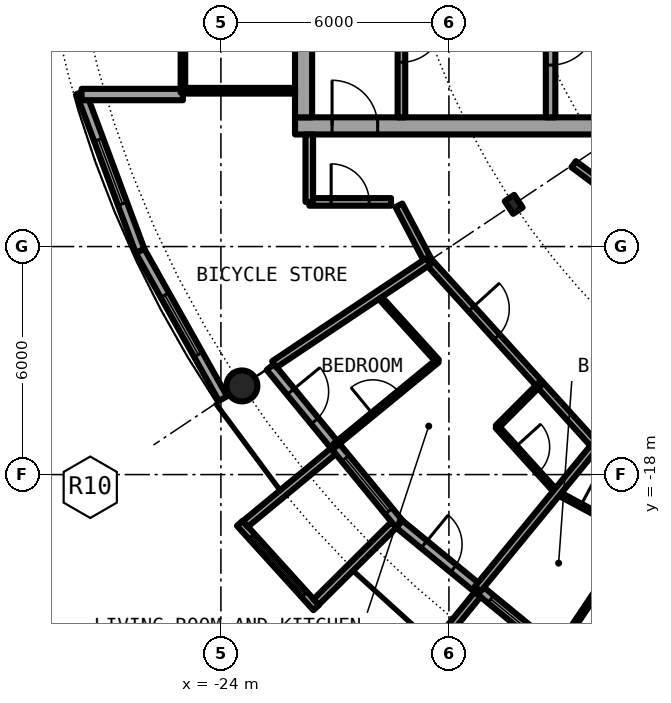
"""IFC4 building model, lengths in metres.
Left out: names, types, materials, properties, quantities, classifications, styles, units other than length and angle.
Written with IfcOpenShell. Run it as: python <this file> out.ifc"""

import sys

from ifc_helpers import new_model, si_unit, direction, frame, frame_2d, origin, origin_2d, place, context, subcontext, project, spatial, rectangle, circle, hollow_circle, i_section, extrude, element, fill, save


model = new_model("IFC4")
c1 = context("Model", 3, precision=1e-05, world=origin(), true_north=direction((0.0, 1.0)))
c2 = subcontext(c1, "Body", "Model", "MODEL_VIEW")
j1 = project(units=[si_unit("LENGTHUNIT", "METRE"), si_unit("PLANEANGLEUNIT", "RADIAN")], contexts=[c1])
p1 = place(None, origin())
s1 = spatial("IfcSite", under=j1, at=p1, CompositionType="ELEMENT")
p2 = place(p1, origin())
s2 = spatial("IfcBuilding", under=s1, at=p2, CompositionType="ELEMENT")
p3 = place(p2, frame((0.0, 0.0, 218.8)))
s3 = spatial("IfcBuildingStorey", under=s2, at=p3, CompositionType="ELEMENT", Elevation=218.8)
p4 = place(p3, frame((-23.448, -15.667, 0.0), z_axis=(0.0, 0.0, 1.0), x_axis=(1.0, 0.0, 0.0)))
e1 = element("IfcColumn", 1, at=p4, inside=s3, PredefinedType="COLUMN", context=c2, shape_type="SweptSolid", body=[
    extrude(hollow_circle(Radius=0.406, WallThickness=0.03, at=origin_2d()), origin(), (0.0, 0.0, 1.0), 3.05),
])
p5 = place(p3, frame((-16.297, -10.889, 0.0), z_axis=(0.0, 0.0, 1.0), x_axis=(-0.831469612303, -0.55557023302, 0.0)))
e2 = element("IfcColumn", 2, at=p5, inside=s3, PredefinedType="COLUMN", context=c2, shape_type="SweptSolid", body=[
    extrude(i_section(OverallWidth=0.3, OverallDepth=0.4, WebThickness=0.013, FlangeThickness=0.024, FilletRadius=0.027, at=origin_2d()), origin(), (0.0, 0.0, 1.0), 3.05),
])
p6 = place(p3, frame((-22.699, -15.167, 0.0), z_axis=(0.0, 0.0, 1.0), x_axis=(0.634382322723, -0.773019449054, 0.0)))
e3 = element("IfcWall", 3, at=p6, inside=s3, PredefinedType="SOLIDWALL", context=c2, shape_type="SweptSolid", body=[
    extrude(rectangle(XDim=5.352, YDim=0.25, at=frame_2d((2.676, 0.0))), origin(), (0.0, 0.0, 1.0), 2.65),
])
p7 = place(p6, frame((0.841, 0.0, 0.0)))
e4 = element("IfcOpeningElement", 4, at=p7, cuts=e3, PredefinedType="OPENING", context=c2, shape_type="SweptSolid", body=[
    extrude(rectangle(XDim=1.0, YDim=2.2, at=frame_2d((0.5, 1.1))), frame((0.0, 0.135, 0.0), z_axis=(0.0, -1.0, 0.0), x_axis=(1.0, 0.0, 0.0)), (0.0, 0.0, 1.0), 0.27),
])
p8 = place(p6, frame((3.111, 0.0, 0.3)))
e5 = element("IfcOpeningElement", 5, at=p8, cuts=e3, PredefinedType="OPENING", context=c2, shape_type="SweptSolid", body=[
    extrude(rectangle(XDim=1.8, YDim=2.1, at=frame_2d((0.9, 1.05))), frame((0.0, 0.135, 0.0), z_axis=(0.0, -1.0, 0.0), x_axis=(1.0, 0.0, 0.0)), (0.0, 0.0, 1.0), 0.27),
])
p9 = place(p3, frame((-23.503, -19.282, -0.03), z_axis=(0.0, 0.0, 1.0), x_axis=(0.671506829416, -0.740998365753, 0.0)))
e6 = element("IfcWall", 6, at=p9, inside=s3, PredefinedType="SOLIDWALL", context=c2, shape_type="SweptSolid", body=[
    extrude(rectangle(XDim=2.993, YDim=0.2, at=frame_2d((1.497, 0.0))), origin(), (0.0, 0.0, 1.0), 2.68),
])
p10 = place(p9, frame((0.457, 0.0, 0.33)))
e7 = element("IfcOpeningElement", 7, at=p10, cuts=e6, PredefinedType="OPENING", context=c2, shape_type="SweptSolid", body=[
    extrude(circle(Radius=1.04, at=frame_2d((1.04, 1.04))), frame((0.0, 0.11, 0.0), z_axis=(0.0, -1.0, 0.0), x_axis=(1.0, 0.0, 0.0)), (0.0, 0.0, 1.0), 0.22),
])
p11 = place(p3, frame((-21.041, -17.384, -0.03), z_axis=(0.0, 0.0, 1.0), x_axis=(-0.770784861449, -0.63709551667, 0.0)))
e8 = element("IfcWall", 8, at=p11, inside=s3, PredefinedType="SOLIDWALL", context=c2, shape_type="SweptSolid", body=[
    extrude(rectangle(XDim=3.006, YDim=0.2, at=frame_2d((1.503, 0.0))), origin(), (0.0, 0.0, 1.0), 2.68),
])
p12 = place(p3, frame((-19.45, -19.323, -0.03), z_axis=(0.0, 0.0, 1.0), x_axis=(-0.709727076896, -0.704476739375, 0.0)))
e9 = element("IfcWall", 9, at=p12, inside=s3, PredefinedType="SOLIDWALL", context=c2, shape_type="SweptSolid", body=[
    extrude(rectangle(XDim=2.883, YDim=0.2, at=frame_2d((1.441, 0.0))), origin(), (0.0, 0.0, 1.0), 2.68),
])
p13 = place(p3, frame((-19.304, -19.304, 0.0), z_axis=(0.0, 0.0, 1.0), x_axis=(0.773019449054, -0.634382322723, 0.0)))
e10 = element("IfcWall", 10, at=p13, inside=s3, PredefinedType="SOLIDWALL", context=c2, shape_type="SweptSolid", body=[
    extrude(rectangle(XDim=5.352, YDim=0.25, at=frame_2d((2.676, 0.0))), origin(), (0.0, 0.0, 1.0), 2.65),
])
p14 = place(p13, frame((0.841, 0.0, 0.0)))
e11 = element("IfcOpeningElement", 11, at=p14, cuts=e10, PredefinedType="OPENING", context=c2, shape_type="SweptSolid", body=[
    extrude(rectangle(XDim=1.0, YDim=2.2, at=frame_2d((0.5, 1.1))), frame((0.0, 0.135, 0.0), z_axis=(0.0, -1.0, 0.0), x_axis=(1.0, 0.0, 0.0)), (0.0, 0.0, 1.0), 0.27),
])
p15 = place(p13, frame((3.111, 0.0, 0.3)))
e12 = element("IfcOpeningElement", 12, at=p15, cuts=e10, PredefinedType="OPENING", context=c2, shape_type="SweptSolid", body=[
    extrude(rectangle(XDim=1.8, YDim=2.1, at=frame_2d((0.9, 1.05))), frame((0.0, 0.135, 0.0), z_axis=(0.0, -1.0, 0.0), x_axis=(1.0, 0.0, 0.0)), (0.0, 0.0, 1.0), 0.27),
])
p16 = place(p3, frame((-17.246, -21.155, -0.03), z_axis=(0.0, 0.0, 1.0), x_axis=(-0.631741648902, -0.775179004516, 0.0)))
e13 = element("IfcWall", 13, at=p16, inside=s3, PredefinedType="SOLIDWALL", context=c2, shape_type="SweptSolid", body=[
    extrude(rectangle(XDim=3.006, YDim=0.2, at=frame_2d((1.503, 0.0))), origin(), (0.0, 0.0, 1.0), 2.68),
])
p17 = place(p3, frame((-27.682, -7.945, 0.0), z_axis=(0.0, 0.0, 1.0), x_axis=(0.349247811493, -0.937030397675, 0.0)))
e14 = element("IfcWall", 14, at=p17, inside=s3, PredefinedType="SOLIDWALL", context=c2, shape_type="SweptSolid", body=[
    extrude(rectangle(XDim=4.452, YDim=0.25, at=frame_2d((2.226, 0.0))), origin(), (0.0, 0.0, 1.0), 2.65),
])
p18 = place(p17, frame((1.327, 0.0, 0.3)))
e15 = element("IfcOpeningElement", 15, at=p18, cuts=e14, PredefinedType="OPENING", context=c2, shape_type="SweptSolid", body=[
    extrude(rectangle(XDim=1.8, YDim=2.1, at=frame_2d((0.9, 1.05))), frame((0.0, 0.135, 0.0), z_axis=(0.0, -1.0, 0.0), x_axis=(1.0, 0.0, 0.0)), (0.0, 0.0, 1.0), 0.27),
])
p19 = place(p3, frame((-26.127, -12.117, 0.0), z_axis=(0.0, 0.0, 1.0), x_axis=(0.489696356642, -0.871893042919, 0.0)))
e16 = element("IfcWall", 16, at=p19, inside=s3, PredefinedType="SOLIDWALL", context=c2, shape_type="SweptSolid", body=[
    extrude(rectangle(XDim=4.454, YDim=0.25, at=frame_2d((2.227, 0.0))), origin(), (0.0, 0.0, 1.0), 2.65),
])
p20 = place(p19, frame((1.327, 0.0, 0.3)))
e17 = element("IfcOpeningElement", 17, at=p20, cuts=e16, PredefinedType="OPENING", context=c2, shape_type="SweptSolid", body=[
    extrude(rectangle(XDim=1.8, YDim=2.1, at=frame_2d((0.9, 1.05))), frame((0.0, 0.135, 0.0), z_axis=(0.0, -1.0, 0.0), x_axis=(1.0, 0.0, 0.0)), (0.0, 0.0, 1.0), 0.27),
])
p21 = place(p3, frame((-25.0, -8.0, 0.0), z_axis=(0.0, 0.0, 1.0), x_axis=(-1.0, 0.0, 0.0)))
e18 = element("IfcWall", 18, at=p21, inside=s3, PredefinedType="SOLIDWALL", context=c2, shape_type="SweptSolid", body=[
    extrude(rectangle(XDim=2.667, YDim=0.3, at=frame_2d((1.333, 0.0))), origin(), (0.0, 0.0, 1.0), 2.65),
])
p22 = place(p3, frame((-22.05, -8.825, 0.0), z_axis=(0.0, 0.0, 1.0), x_axis=(1.0, 0.0, 0.0)))
e19 = element("IfcWall", 19, at=p22, inside=s3, PredefinedType="SHEAR", context=c2, shape_type="SweptSolid", body=[
    extrude(rectangle(XDim=13.5, YDim=0.45, at=frame_2d((6.75, 0.0))), origin(), (0.0, 0.0, 1.0), 3.05),
])
p23 = place(p22, frame((0.975, 0.0, 0.0)))
e20 = element("IfcOpeningElement", 20, at=p23, cuts=e19, PredefinedType="OPENING", context=c2, shape_type="SweptSolid", body=[
    extrude(rectangle(XDim=1.2, YDim=2.3, at=frame_2d((0.6, 1.15))), frame((0.0, 0.235, 0.0), z_axis=(0.0, -1.0, 0.0), x_axis=(1.0, 0.0, 0.0)), (0.0, 0.0, 1.0), 0.47),
])
p24 = place(p3, frame((-21.825, -8.6, 0.0), z_axis=(0.0, 0.0, 1.0), x_axis=(0.0, 1.0, 0.0)))
e21 = element("IfcWall", 21, at=p24, inside=s3, PredefinedType="SHEAR", context=c2, shape_type="SweptSolid", body=[
    extrude(rectangle(XDim=17.2, YDim=0.45, at=frame_2d((8.6, 0.0))), origin(), (0.0, 0.0, 1.0), 3.05),
])
p25 = place(p24, frame((7.7, 0.0, 0.0)))
e22 = element("IfcOpeningElement", 22, at=p25, cuts=e21, PredefinedType="OPENING", context=c2, shape_type="SweptSolid", body=[
    extrude(rectangle(XDim=1.8, YDim=2.3, at=frame_2d((0.9, 1.15))), frame((0.0, 0.235, 0.0), z_axis=(0.0, -1.0, 0.0), x_axis=(1.0, 0.0, 0.0)), (0.0, 0.0, 1.0), 0.47),
])
p26 = place(p3, frame((-15.325, -4.65, 0.0), z_axis=(0.0, 0.0, 1.0), x_axis=(0.0, -1.0, 0.0)))
e23 = element("IfcWall", 23, at=p26, inside=s3, PredefinedType="SHEAR", context=c2, shape_type="SweptSolid", body=[
    extrude(rectangle(XDim=3.95, YDim=0.25, at=frame_2d((1.975, 0.0))), origin(), (0.0, 0.0, 1.0), 3.05),
])
p27 = place(p26, frame((1.375, 0.0, 0.0)))
e24 = element("IfcOpeningElement", 24, at=p27, cuts=e23, PredefinedType="OPENING", context=c2, shape_type="SweptSolid", body=[
    extrude(rectangle(XDim=1.2, YDim=2.3, at=frame_2d((0.6, 1.15))), frame((0.0, 0.135, 0.0), z_axis=(0.0, -1.0, 0.0), x_axis=(1.0, 0.0, 0.0)), (0.0, 0.0, 1.0), 0.27),
])
p28 = place(p3, frame((-19.25, -1.575, 0.0), z_axis=(0.0, 0.0, 1.0), x_axis=(0.0, -1.0, 0.0)))
e25 = element("IfcWall", 25, at=p28, inside=s3, PredefinedType="SOLIDWALL", context=c2, shape_type="SweptSolid", body=[
    extrude(rectangle(XDim=7.025, YDim=0.2, at=frame_2d((3.513, 0.0))), origin(), (0.0, 0.0, 1.0), 2.65),
])
p29 = place(p28, frame((4.475, 0.0, 0.0)))
e26 = element("IfcOpeningElement", 26, at=p29, cuts=e25, PredefinedType="OPENING", context=c2, shape_type="SweptSolid", body=[
    extrude(rectangle(XDim=1.1, YDim=2.3, at=frame_2d((0.55, 1.15))), frame((0.0, 0.11, 0.0), z_axis=(0.0, -1.0, 0.0), x_axis=(1.0, 0.0, 0.0)), (0.0, 0.0, 1.0), 0.22),
])
p30 = place(p3, frame((-22.05, -7.9, 0.0), z_axis=(0.0, 0.0, 1.0), x_axis=(-1.0, 0.0, 0.0)))
e27 = element("IfcWall", 27, at=p30, inside=s3, PredefinedType="PARTITIONING", context=c2, shape_type="SweptSolid", body=[
    extrude(rectangle(XDim=2.89, YDim=0.15, at=frame_2d((1.445, 0.0))), origin(), (0.0, 0.0, 1.0), 2.65),
])
p31 = place(p3, frame((-25.0, 7.95, 0.0), z_axis=(0.0, 0.0, 1.0), x_axis=(0.0, -1.0, 0.0)))
e28 = element("IfcWall", 28, at=p31, inside=s3, PredefinedType="PARTITIONING", context=c2, shape_type="SweptSolid", body=[
    extrude(rectangle(XDim=15.9, YDim=0.12, at=frame_2d((7.95, 0.0))), origin(), (0.0, 0.0, 1.0), 2.65),
])
p32 = place(p31, frame((0.95, 0.0, 0.1)))
e29 = element("IfcOpeningElement", 29, at=p32, cuts=e28, PredefinedType="OPENING", context=c2, shape_type="SweptSolid", body=[
    extrude(rectangle(XDim=14.0, YDim=1.85, at=frame_2d((7.0, 0.925))), frame((0.0, 0.07, 0.0), z_axis=(0.0, -1.0, 0.0), x_axis=(1.0, 0.0, 0.0)), (0.0, 0.0, 1.0), 0.14),
])
p33 = place(p3, frame((-19.872, -13.278, 0.0), z_axis=(0.0, 0.0, 1.0), x_axis=(0.671637685376, -0.740879760544, 0.0)))
e30 = element("IfcWall", 30, at=p33, inside=s3, PredefinedType="PARTITIONING", context=c2, shape_type="SweptSolid", body=[
    extrude(rectangle(XDim=2.338, YDim=0.1, at=frame_2d((1.169, 0.0))), origin(), (0.0, 0.0, 1.0), 2.65),
])
p34 = place(p3, frame((-16.732, -16.743, 0.0), z_axis=(0.0, 0.0, 1.0), x_axis=(0.671528384412, -0.740978831634, 0.0)))
e31 = element("IfcWall", 31, at=p34, inside=s3, PredefinedType="PARTITIONING", context=c2, shape_type="SweptSolid", body=[
    extrude(rectangle(XDim=2.338, YDim=0.1, at=frame_2d((1.169, 0.0))), origin(), (0.0, 0.0, 1.0), 2.65),
])
p35 = place(p34, frame((0.719, 0.0, 0.0)))
e32 = element("IfcOpeningElement", 32, at=p35, cuts=e31, PredefinedType="OPENING", context=c2, shape_type="SweptSolid", body=[
    extrude(rectangle(XDim=0.9, YDim=2.3, at=frame_2d((0.45, 1.15))), frame((0.0, 0.06, 0.0), z_axis=(0.0, -1.0, 0.0), x_axis=(1.0, 0.0, 0.0)), (0.0, 0.0, 1.0), 0.12),
])
p36 = place(p3, frame((-15.162, -18.475, 0.0), z_axis=(0.0, 0.0, 1.0), x_axis=(0.881916280728, -0.471406060405, 0.0)))
e33 = element("IfcWall", 33, at=p36, inside=s3, PredefinedType="PARTITIONING", context=c2, shape_type="SweptSolid", body=[
    extrude(rectangle(XDim=4.663, YDim=0.1, at=frame_2d((2.331, 0.0))), origin(), (0.0, 0.0, 1.0), 2.65),
])
p37 = place(p36, frame((0.716, 0.0, 0.0)))
e34 = element("IfcOpeningElement", 34, at=p37, cuts=e33, PredefinedType="OPENING", context=c2, shape_type="SweptSolid", body=[
    extrude(rectangle(XDim=0.9, YDim=2.3, at=frame_2d((0.45, 1.15))), frame((0.0, 0.06, 0.0), z_axis=(0.0, -1.0, 0.0), x_axis=(1.0, 0.0, 0.0)), (0.0, 0.0, 1.0), 0.12),
])
p38 = place(p3, frame((-19.317, -10.915, 0.0), z_axis=(0.0, 0.0, 1.0), x_axis=(0.465359652486, -0.885121683068, 0.0)))
e35 = element("IfcWall", 35, at=p38, inside=s3, PredefinedType="PARTITIONING", context=c2, shape_type="SweptSolid", body=[
    extrude(rectangle(XDim=1.665, YDim=0.2, at=frame_2d((0.833, 0.0))), origin(), (0.0, 0.0, 1.0), 2.65),
])
p39 = place(p3, frame((-18.542, -12.389, 0.0), z_axis=(0.0, 0.0, 1.0), x_axis=(0.671561669125, -0.740948665268, 0.0)))
e36 = element("IfcWall", 36, at=p39, inside=s3, PredefinedType="PARTITIONING", context=c2, shape_type="SweptSolid", body=[
    extrude(rectangle(XDim=6.544, YDim=0.2, at=frame_2d((3.272, 0.0))), origin(), (0.0, 0.0, 1.0), 2.65),
])
p40 = place(p39, frame((1.682, 0.0, 0.0)))
e37 = element("IfcOpeningElement", 37, at=p40, cuts=e36, PredefinedType="OPENING", context=c2, shape_type="SweptSolid", body=[
    extrude(rectangle(XDim=1.0, YDim=2.3, at=frame_2d((0.5, 1.15))), frame((0.0, 0.11, 0.0), z_axis=(0.0, -1.0, 0.0), x_axis=(1.0, 0.0, 0.0)), (0.0, 0.0, 1.0), 0.22),
])
p41 = place(p3, frame((-14.718, -9.833, 0.0), z_axis=(0.0, 0.0, 1.0), x_axis=(0.803240181354, -0.595655278712, 0.0)))
e38 = element("IfcWall", 38, at=p41, inside=s3, PredefinedType="PARTITIONING", context=c2, shape_type="SweptSolid", body=[
    extrude(rectangle(XDim=11.928, YDim=0.2, at=frame_2d((5.964, 0.0))), origin(), (0.0, 0.0, 1.0), 2.65),
])
p42 = place(p41, frame((6.316, 0.0, 0.0)))
e39 = element("IfcOpeningElement", 39, at=p42, cuts=e38, PredefinedType="OPENING", context=c2, shape_type="SweptSolid", body=[
    extrude(rectangle(XDim=1.0, YDim=2.3, at=frame_2d((0.5, 1.15))), frame((0.0, 0.11, 0.0), z_axis=(0.0, -1.0, 0.0), x_axis=(1.0, 0.0, 0.0)), (0.0, 0.0, 1.0), 0.22),
])
p43 = place(p3, frame((-21.675, -10.825, 0.0), z_axis=(0.0, 0.0, 1.0), x_axis=(1.0, 0.0, 0.0)))
e40 = element("IfcWall", 40, at=p43, inside=s3, PredefinedType="PARTITIONING", context=c2, shape_type="SweptSolid", body=[
    extrude(rectangle(XDim=2.152, YDim=0.2, at=frame_2d((1.076, 0.0))), origin(), (0.0, 0.0, 1.0), 2.65),
])
p44 = place(p43, frame((0.576, 0.0, 0.0)))
e41 = element("IfcOpeningElement", 41, at=p44, cuts=e40, PredefinedType="OPENING", context=c2, shape_type="SweptSolid", body=[
    extrude(rectangle(XDim=1.0, YDim=2.3, at=frame_2d((0.5, 1.15))), frame((0.0, 0.11, 0.0), z_axis=(0.0, -1.0, 0.0), x_axis=(1.0, 0.0, 0.0)), (0.0, 0.0, 1.0), 0.22),
])
p45 = place(p3, frame((-22.595, -15.098, 0.0), z_axis=(0.0, 0.0, 1.0), x_axis=(0.831387096605, 0.55569370664, 0.0)))
e42 = element("IfcWall", 42, at=p45, inside=s3, PredefinedType="PARTITIONING", context=c2, shape_type="SweptSolid", body=[
    extrude(rectangle(XDim=4.875, YDim=0.2, at=frame_2d((2.438, 0.0))), origin(), (0.0, 0.0, 1.0), 2.65),
])
p46 = place(p3, frame((-21.012, -17.233, 0.0), z_axis=(0.0, 0.0, 1.0), x_axis=(0.773165322764, 0.634204528267, 0.0)))
e43 = element("IfcWall", 43, at=p46, inside=s3, PredefinedType="PARTITIONING", context=c2, shape_type="SweptSolid", body=[
    extrude(rectangle(XDim=3.505, YDim=0.1, at=frame_2d((1.752, 0.0))), origin(), (0.0, 0.0, 1.0), 2.65),
])
p47 = place(p46, frame((1.303, 0.0, 0.0)))
e44 = element("IfcOpeningElement", 44, at=p47, cuts=e43, PredefinedType="OPENING", context=c2, shape_type="SweptSolid", body=[
    extrude(rectangle(XDim=0.9, YDim=2.3, at=frame_2d((0.45, 1.15))), frame((0.0, 0.06, 0.0), z_axis=(0.0, -1.0, 0.0), x_axis=(1.0, 0.0, 0.0)), (0.0, 0.0, 1.0), 0.12),
])
p48 = place(p3, frame((-17.24, -21.007, 0.0), z_axis=(0.0, 0.0, 1.0), x_axis=(0.634374159378, 0.773026148273, 0.0)))
e45 = element("IfcWall", 45, at=p48, inside=s3, PredefinedType="PARTITIONING", context=c2, shape_type="SweptSolid", body=[
    extrude(rectangle(XDim=4.876, YDim=0.2, at=frame_2d((2.438, 0.0))), origin(), (0.0, 0.0, 1.0), 2.65),
])
p49 = place(p3, frame((-16.732, -16.743, 0.0), z_axis=(0.0, 0.0, 1.0), x_axis=(0.70679853939, 0.707414888673, 0.0)))
e46 = element("IfcWall", 46, at=p49, inside=s3, PredefinedType="PARTITIONING", context=c2, shape_type="SweptSolid", body=[
    extrude(rectangle(XDim=1.584, YDim=0.1, at=frame_2d((0.792, 0.0))), origin(), (0.0, 0.0, 1.0), 2.65),
])
p50 = place(p3, frame((-15.119, -22.581, 0.0), z_axis=(0.0, 0.0, 1.0), x_axis=(0.556271723484, 0.831000463088, 0.0)))
e47 = element("IfcWall", 47, at=p50, inside=s3, PredefinedType="PARTITIONING", context=c2, shape_type="SweptSolid", body=[
    extrude(rectangle(XDim=3.619, YDim=0.1, at=frame_2d((1.809, 0.0))), origin(), (0.0, 0.0, 1.0), 2.65),
])
p51 = place(p3, frame((-21.675, -10.825, 0.0), z_axis=(0.0, 0.0, 1.0), x_axis=(0.0, 1.0, 0.0)))
e48 = element("IfcWall", 48, at=p51, inside=s3, PredefinedType="PARTITIONING", context=c2, shape_type="SweptSolid", body=[
    extrude(rectangle(XDim=1.775, YDim=0.2, at=frame_2d((0.887, 0.0))), origin(), (0.0, 0.0, 1.0), 2.65),
])
p52 = place(p7, origin())
e49 = element("IfcDoor", 49, at=p52, inside=s3, OperationType="SINGLE_SWING_LEFT", PredefinedType="DOOR", context=c2, shape_type="SweptSolid", body=[
    extrude(rectangle(XDim=1.0, YDim=2.2, at=frame_2d((0.5, 1.1))), frame((0.0, 0.025, 0.0), z_axis=(0.0, -1.0, 0.0), x_axis=(1.0, 0.0, 0.0)), (0.0, 0.0, 1.0), 0.05),
])
fill(e4, e49)
p53 = place(p8, origin())
e50 = element("IfcWindow", 50, at=p53, inside=s3, PartitioningType="SINGLE_PANEL", PredefinedType="WINDOW", context=c2, shape_type="SweptSolid", body=[
    extrude(rectangle(XDim=1.8, YDim=2.1, at=frame_2d((0.9, 1.05))), frame((0.0, 0.03, 0.0), z_axis=(0.0, -1.0, 0.0), x_axis=(1.0, 0.0, 0.0)), (0.0, 0.0, 1.0), 0.06),
])
fill(e5, e50)
p54 = place(p10, origin())
e51 = element("IfcWindow", 51, at=p54, inside=s3, PartitioningType="SINGLE_PANEL", PredefinedType="WINDOW", context=c2, shape_type="SweptSolid", body=[
    extrude(circle(Radius=1.04, at=frame_2d((1.04, 1.04))), frame((0.0, 0.03, 0.0), z_axis=(0.0, -1.0, 0.0), x_axis=(1.0, 0.0, 0.0)), (0.0, 0.0, 1.0), 0.06),
])
fill(e7, e51)
p55 = place(p14, origin())
e52 = element("IfcDoor", 52, at=p55, inside=s3, OperationType="SINGLE_SWING_LEFT", PredefinedType="DOOR", context=c2, shape_type="SweptSolid", body=[
    extrude(rectangle(XDim=1.0, YDim=2.2, at=frame_2d((0.5, 1.1))), frame((0.0, 0.025, 0.0), z_axis=(0.0, -1.0, 0.0), x_axis=(1.0, 0.0, 0.0)), (0.0, 0.0, 1.0), 0.05),
])
fill(e11, e52)
p56 = place(p15, origin())
e53 = element("IfcWindow", 53, at=p56, inside=s3, PartitioningType="SINGLE_PANEL", PredefinedType="WINDOW", context=c2, shape_type="SweptSolid", body=[
    extrude(rectangle(XDim=1.8, YDim=2.1, at=frame_2d((0.9, 1.05))), frame((0.0, 0.03, 0.0), z_axis=(0.0, -1.0, 0.0), x_axis=(1.0, 0.0, 0.0)), (0.0, 0.0, 1.0), 0.06),
])
fill(e12, e53)
p57 = place(p18, origin())
e54 = element("IfcWindow", 54, at=p57, inside=s3, PartitioningType="SINGLE_PANEL", PredefinedType="WINDOW", context=c2, shape_type="SweptSolid", body=[
    extrude(rectangle(XDim=1.8, YDim=2.1, at=frame_2d((0.9, 1.05))), frame((0.0, 0.03, 0.0), z_axis=(0.0, -1.0, 0.0), x_axis=(1.0, 0.0, 0.0)), (0.0, 0.0, 1.0), 0.06),
])
fill(e15, e54)
p58 = place(p20, origin())
e55 = element("IfcWindow", 55, at=p58, inside=s3, PartitioningType="SINGLE_PANEL", PredefinedType="WINDOW", context=c2, shape_type="SweptSolid", body=[
    extrude(rectangle(XDim=1.8, YDim=2.1, at=frame_2d((0.9, 1.05))), frame((0.0, 0.03, 0.0), z_axis=(0.0, -1.0, 0.0), x_axis=(1.0, 0.0, 0.0)), (0.0, 0.0, 1.0), 0.06),
])
fill(e17, e55)
p59 = place(p27, origin())
e56 = element("IfcDoor", 56, at=p59, inside=s3, OperationType="SINGLE_SWING_LEFT", PredefinedType="DOOR", context=c2, shape_type="SweptSolid", body=[
    extrude(rectangle(XDim=1.2, YDim=2.3, at=frame_2d((0.6, 1.15))), frame((0.0, 0.025, 0.0), z_axis=(0.0, -1.0, 0.0), x_axis=(1.0, 0.0, 0.0)), (0.0, 0.0, 1.0), 0.05),
])
fill(e24, e56)
p60 = place(p29, origin())
e57 = element("IfcDoor", 57, at=p60, inside=s3, OperationType="SINGLE_SWING_LEFT", PredefinedType="DOOR", context=c2, shape_type="SweptSolid", body=[
    extrude(rectangle(XDim=1.1, YDim=2.3, at=frame_2d((0.55, 1.15))), frame((0.0, 0.025, 0.0), z_axis=(0.0, -1.0, 0.0), x_axis=(1.0, 0.0, 0.0)), (0.0, 0.0, 1.0), 0.05),
])
fill(e26, e57)
p61 = place(p23, origin())
e58 = element("IfcDoor", 58, at=p61, inside=s3, OperationType="SINGLE_SWING_RIGHT", PredefinedType="DOOR", context=c2, shape_type="SweptSolid", body=[
    extrude(rectangle(XDim=1.2, YDim=2.3, at=frame_2d((0.6, 1.15))), frame((0.0, 0.025, 0.0), z_axis=(0.0, -1.0, 0.0), x_axis=(1.0, 0.0, 0.0)), (0.0, 0.0, 1.0), 0.05),
])
fill(e20, e58)
p62 = place(p32, origin())
e59 = element("IfcWindow", 59, at=p62, inside=s3, PartitioningType="SINGLE_PANEL", PredefinedType="WINDOW", context=c2, shape_type="SweptSolid", body=[
    extrude(rectangle(XDim=14.0, YDim=1.85, at=frame_2d((7.0, 0.925))), frame((0.0, 0.03, 0.0), z_axis=(0.0, -1.0, 0.0), x_axis=(1.0, 0.0, 0.0)), (0.0, 0.0, 1.0), 0.06),
])
fill(e29, e59)
p63 = place(p40, origin())
e60 = element("IfcDoor", 60, at=p63, inside=s3, OperationType="SINGLE_SWING_LEFT", PredefinedType="DOOR", context=c2, shape_type="SweptSolid", body=[
    extrude(rectangle(XDim=1.0, YDim=2.3, at=frame_2d((0.5, 1.15))), frame((0.0, 0.025, 0.0), z_axis=(0.0, -1.0, 0.0), x_axis=(1.0, 0.0, 0.0)), (0.0, 0.0, 1.0), 0.05),
])
fill(e37, e60)
p64 = place(p35, origin())
e61 = element("IfcDoor", 61, at=p64, inside=s3, OperationType="SINGLE_SWING_LEFT", PredefinedType="DOOR", context=c2, shape_type="SweptSolid", body=[
    extrude(rectangle(XDim=0.9, YDim=2.3, at=frame_2d((0.45, 1.15))), frame((0.0, 0.025, 0.0), z_axis=(0.0, -1.0, 0.0), x_axis=(1.0, 0.0, 0.0)), (0.0, 0.0, 1.0), 0.05),
])
fill(e32, e61)
p65 = place(p47, origin())
e62 = element("IfcDoor", 62, at=p65, inside=s3, OperationType="SINGLE_SWING_LEFT", PredefinedType="DOOR", context=c2, shape_type="SweptSolid", body=[
    extrude(rectangle(XDim=0.9, YDim=2.3, at=frame_2d((0.45, 1.15))), frame((0.0, 0.025, 0.0), z_axis=(0.0, -1.0, 0.0), x_axis=(1.0, 0.0, 0.0)), (0.0, 0.0, 1.0), 0.05),
])
fill(e44, e62)
p66 = place(p37, origin())
e63 = element("IfcDoor", 63, at=p66, inside=s3, OperationType="SINGLE_SWING_LEFT", PredefinedType="DOOR", context=c2, shape_type="SweptSolid", body=[
    extrude(rectangle(XDim=0.9, YDim=2.3, at=frame_2d((0.45, 1.15))), frame((0.0, 0.025, 0.0), z_axis=(0.0, -1.0, 0.0), x_axis=(1.0, 0.0, 0.0)), (0.0, 0.0, 1.0), 0.05),
])
fill(e34, e63)
p67 = place(p44, origin())
e64 = element("IfcDoor", 64, at=p67, inside=s3, OperationType="SINGLE_SWING_LEFT", PredefinedType="DOOR", context=c2, shape_type="SweptSolid", body=[
    extrude(rectangle(XDim=1.0, YDim=2.3, at=frame_2d((0.5, 1.15))), frame((0.0, 0.025, 0.0), z_axis=(0.0, -1.0, 0.0), x_axis=(1.0, 0.0, 0.0)), (0.0, 0.0, 1.0), 0.05),
])
fill(e41, e64)
save(model, sys.argv[1])
